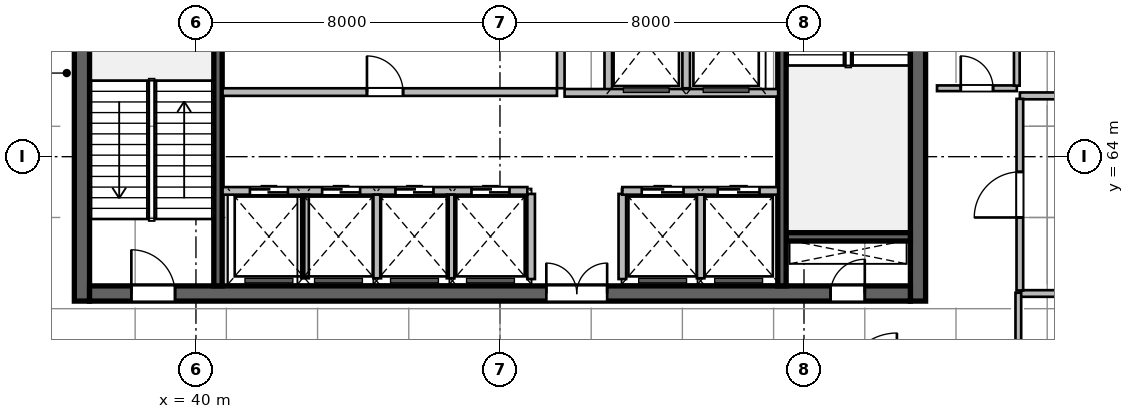
"""IFC4 building model, lengths in metres.
Left out: names, types, materials, properties, quantities, classifications, styles, units other than length and angle.
Written with IfcOpenShell. Run it as: python <this file> out.ifc"""

import sys

from ifc_helpers import new_model, si_unit, direction, frame, frame_2d, origin, place, context, subcontext, project, spatial, rectangle, extrude, source, transform, mapped, element, fill, save


model = new_model("IFC4")
c1 = context("Model", 3, precision=1e-05, world=origin(), true_north=direction((0.0, 1.0)))
c2 = subcontext(c1, "Body", "Model", "MODEL_VIEW")
j1 = project(units=[si_unit("LENGTHUNIT", "METRE"), si_unit("PLANEANGLEUNIT", "RADIAN")], contexts=[c1])
p1 = place(None, origin())
s1 = spatial("IfcSite", under=j1, at=p1, CompositionType="ELEMENT")
p2 = place(p1, origin())
s2 = spatial("IfcBuilding", under=s1, at=p2, CompositionType="ELEMENT")
p3 = place(p2, frame((0.0, 0.0, 303.0)))
s3 = spatial("IfcBuildingStorey", under=s2, at=p3, CompositionType="ELEMENT", Elevation=303.0)
m1 = source(origin(), c2, "Body", "SweptSolid", [
    extrude(rectangle(XDim=12.0, YDim=0.4, at=frame_2d((6.0, 0.0))), origin(), (0.0, 0.0, 1.0), 4.8),
])
for number, where, z_axis, x_axis in (
    (1, (37.0, 60.2, 0.0), (0.0, 0.0, 1.0), (0.0, 1.0, 0.0)),
    (2, (59.0, 60.2, 0.0), (0.0, 0.0, 1.0), (0.0, 1.0, 0.0)),
):
    element("IfcWall", number, at=place(p3, frame(where, z_axis=z_axis, x_axis=x_axis)), inside=s3, PredefinedType="SHEAR", context=c2, shape_type="MappedRepresentation", body=[
        mapped(m1, transform((0.0, 0.0, 0.0), scale=1.0)),
    ])
m2 = source(origin(), c2, "Body", "SweptSolid", [
    extrude(rectangle(XDim=21.6, YDim=0.4, at=frame_2d((10.8, 0.0))), origin(), (0.0, 0.0, 1.0), 4.8),
])
p4 = place(p3, frame((37.2, 60.4, 0.0), z_axis=(0.0, 0.0, 1.0), x_axis=(1.0, 0.0, 0.0)))
e3 = element("IfcWall", 3, at=p4, inside=s3, PredefinedType="SHEAR", context=c2, shape_type="MappedRepresentation", body=[
    mapped(m2, transform((0.0, 0.0, 0.0), scale=1.0)),
])
p5 = place(p4, frame((1.1, 0.0, 0.0)))
e4 = element("IfcOpeningElement", 4, at=p5, cuts=e3, PredefinedType="OPENING", context=c2, shape_type="SweptSolid", body=[
    extrude(rectangle(XDim=1.15, YDim=2.15, at=frame_2d((0.575, 1.075))), frame((0.0, 0.21, 0.0), z_axis=(0.0, -1.0, 0.0), x_axis=(1.0, 0.0, 0.0)), (0.0, 0.0, 1.0), 0.42),
])
p6 = place(p4, frame((19.5, 0.0, 0.0)))
e5 = element("IfcOpeningElement", 5, at=p6, cuts=e3, PredefinedType="OPENING", context=c2, shape_type="SweptSolid", body=[
    extrude(rectangle(XDim=0.9, YDim=2.1, at=frame_2d((0.45, 1.05))), frame((0.0, 0.21, 0.0), z_axis=(0.0, -1.0, 0.0), x_axis=(1.0, 0.0, 0.0)), (0.0, 0.0, 1.0), 0.42),
])
p7 = place(p4, frame((12.02, 0.0, 0.0)))
e6 = element("IfcOpeningElement", 6, at=p7, cuts=e3, PredefinedType="OPENING", context=c2, shape_type="SweptSolid", body=[
    extrude(rectangle(XDim=1.6, YDim=2.15, at=frame_2d((0.8, 1.075))), frame((0.0, 0.21, 0.0), z_axis=(0.0, -1.0, 0.0), x_axis=(1.0, 0.0, 0.0)), (0.0, 0.0, 1.0), 0.42),
])
m3 = source(origin(), c2, "Body", "SweptSolid", [
    extrude(rectangle(XDim=3.27, YDim=0.22, at=frame_2d((1.635, 0.0))), origin(), (0.0, 0.0, 1.0), 4.8),
])
p8 = place(p3, frame((55.53, 61.89, 0.0), z_axis=(0.0, 0.0, 1.0), x_axis=(1.0, 0.0, 0.0)))
e7 = element("IfcWall", 7, at=p8, inside=s3, PredefinedType="SHEAR", context=c2, shape_type="MappedRepresentation", body=[
    mapped(m3, transform((0.0, 0.0, 0.0), scale=1.0)),
])
m4 = source(origin(), c2, "Body", "SweptSolid", [
    extrude(rectangle(XDim=11.2, YDim=0.22, at=frame_2d((5.6, 0.0))), origin(), (0.0, 0.0, 1.0), 4.8),
])
p9 = place(p3, frame((40.58, 60.6, 0.0), z_axis=(0.0, 0.0, 1.0), x_axis=(0.0, 1.0, 0.0)))
e8 = element("IfcWall", 8, at=p9, inside=s3, PredefinedType="SHEAR", context=c2, shape_type="MappedRepresentation", body=[
    mapped(m4, transform((0.0, 0.0, 0.0), scale=1.0)),
])
p10 = place(p3, frame((55.42, 60.6, 0.0), z_axis=(0.0, 0.0, 1.0), x_axis=(0.0, 1.0, 0.0)))
e9 = element("IfcWall", 9, at=p10, inside=s3, PredefinedType="SHEAR", context=c2, shape_type="MappedRepresentation", body=[
    mapped(m4, transform((0.0, 0.0, 0.0), scale=1.0)),
])
p11 = place(p10, frame((9.645, 0.0, 0.0)))
e10 = element("IfcOpeningElement", 10, at=p11, cuts=e9, PredefinedType="OPENING", context=c2, shape_type="SweptSolid", body=[
    extrude(rectangle(XDim=1.15, YDim=2.15, at=frame_2d((0.575, 1.075))), frame((0.0, 0.12, 0.0), z_axis=(0.0, -1.0, 0.0), x_axis=(1.0, 0.0, 0.0)), (0.0, 0.0, 1.0), 0.24),
])
m5 = source(origin(), c2, "Body", "SweptSolid", [
    extrude(rectangle(XDim=2.24, YDim=0.2, at=frame_2d((1.12, 0.0))), origin(), (0.0, 0.0, 1.0), 4.54),
])
for number, where, z_axis, x_axis in (
    (11, (48.82, 60.78, 0.0), (0.0, 0.0, 1.0), (0.0, 1.0, 0.0)),
    (12, (51.22, 60.78, 0.0), (0.0, 0.0, 1.0), (0.0, 1.0, 0.0)),
):
    element("IfcWall", number, at=place(p3, frame(where, z_axis=z_axis, x_axis=x_axis)), inside=s3, PredefinedType="SOLIDWALL", context=c2, shape_type="MappedRepresentation", body=[
        mapped(m5, transform((0.0, 0.0, 0.0), scale=1.0)),
    ])
m6 = source(origin(), c2, "Body", "SweptSolid", [
    extrude(rectangle(XDim=5.8, YDim=0.2, at=frame_2d((2.9, 0.0))), origin(), (0.0, 0.0, 1.0), 4.54),
])
p12 = place(p3, frame((49.6, 65.8, 0.0), z_axis=(0.0, 0.0, 1.0), x_axis=(0.0, 1.0, 0.0)))
e13 = element("IfcWall", 13, at=p12, inside=s3, PredefinedType="SOLIDWALL", context=c2, shape_type="MappedRepresentation", body=[
    mapped(m6, transform((0.0, 0.0, 0.0), scale=1.0)),
])
m7 = source(origin(), c2, "Body", "SweptSolid", [
    extrude(rectangle(XDim=2.58, YDim=0.2, at=frame_2d((1.29, 0.0))), origin(), (0.0, 0.0, 1.0), 4.54),
])
p13 = place(p3, frame((50.85, 65.68, 0.0), z_axis=(0.0, 0.0, 1.0), x_axis=(0.0, 1.0, 0.0)))
e14 = element("IfcWall", 14, at=p13, inside=s3, PredefinedType="SOLIDWALL", context=c2, shape_type="MappedRepresentation", body=[
    mapped(m7, transform((0.0, 0.0, 0.0), scale=1.0)),
])
m8 = source(origin(), c2, "Body", "SweptSolid", [
    extrude(rectangle(XDim=2.4, YDim=0.2, at=frame_2d((1.2, 0.0))), origin(), (0.0, 0.0, 1.0), 4.54),
])
p14 = place(p3, frame((52.9, 65.8, 0.0), z_axis=(0.0, 0.0, 1.0), x_axis=(0.0, 1.0, 0.0)))
e15 = element("IfcWall", 15, at=p14, inside=s3, PredefinedType="SOLIDWALL", context=c2, shape_type="MappedRepresentation", body=[
    mapped(m8, transform((0.0, 0.0, 0.0), scale=1.0)),
])
m9 = source(origin(), c2, "Body", "SweptSolid", [
    extrude(rectangle(XDim=5.62, YDim=0.2, at=frame_2d((2.81, 0.0))), origin(), (0.0, 0.0, 1.0), 4.54),
])
p15 = place(p3, frame((49.7, 65.68, 0.0), z_axis=(0.0, 0.0, 1.0), x_axis=(1.0, 0.0, 0.0)))
e16 = element("IfcWall", 16, at=p15, inside=s3, PredefinedType="SOLIDWALL", context=c2, shape_type="MappedRepresentation", body=[
    mapped(m9, transform((0.0, 0.0, 0.0), scale=1.0)),
])
m10 = source(origin(), c2, "Body", "SweptSolid", [
    extrude(rectangle(XDim=8.02, YDim=0.2, at=frame_2d((4.01, 0.0))), origin(), (0.0, 0.0, 1.0), 4.54),
])
p16 = place(p3, frame((40.7, 63.1, 0.0), z_axis=(0.0, 0.0, 1.0), x_axis=(1.0, 0.0, 0.0)))
e17 = element("IfcWall", 17, at=p16, inside=s3, PredefinedType="SOLIDWALL", context=c2, shape_type="MappedRepresentation", body=[
    mapped(m10, transform((0.0, 0.0, 0.0), scale=1.0)),
])
p17 = place(p16, frame((0.72, 0.0, 0.0)))
e18 = element("IfcOpeningElement", 18, at=p17, cuts=e17, PredefinedType="OPENING", context=c2, shape_type="SweptSolid", body=[
    extrude(rectangle(XDim=1.0, YDim=2.15, at=frame_2d((0.5, 1.075))), frame((0.0, 0.11, 0.0), z_axis=(0.0, -1.0, 0.0), x_axis=(1.0, 0.0, 0.0)), (0.0, 0.0, 1.0), 0.22),
])
p18 = place(p16, frame((2.62, 0.0, 0.0)))
e19 = element("IfcOpeningElement", 19, at=p18, cuts=e17, PredefinedType="OPENING", context=c2, shape_type="SweptSolid", body=[
    extrude(rectangle(XDim=1.0, YDim=2.15, at=frame_2d((0.5, 1.075))), frame((0.0, 0.11, 0.0), z_axis=(0.0, -1.0, 0.0), x_axis=(1.0, 0.0, 0.0)), (0.0, 0.0, 1.0), 0.22),
])
p19 = place(p16, frame((4.55, 0.0, 0.0)))
e20 = element("IfcOpeningElement", 20, at=p19, cuts=e17, PredefinedType="OPENING", context=c2, shape_type="SweptSolid", body=[
    extrude(rectangle(XDim=1.0, YDim=2.15, at=frame_2d((0.5, 1.075))), frame((0.0, 0.11, 0.0), z_axis=(0.0, -1.0, 0.0), x_axis=(1.0, 0.0, 0.0)), (0.0, 0.0, 1.0), 0.22),
])
p20 = place(p16, frame((6.55, 0.0, 0.0)))
e21 = element("IfcOpeningElement", 21, at=p20, cuts=e17, PredefinedType="OPENING", context=c2, shape_type="SweptSolid", body=[
    extrude(rectangle(XDim=1.0, YDim=2.15, at=frame_2d((0.5, 1.075))), frame((0.0, 0.11, 0.0), z_axis=(0.0, -1.0, 0.0), x_axis=(1.0, 0.0, 0.0)), (0.0, 0.0, 1.0), 0.22),
])
m11 = source(origin(), c2, "Body", "SweptSolid", [
    extrude(rectangle(XDim=4.1, YDim=0.2, at=frame_2d((2.05, 0.0))), origin(), (0.0, 0.0, 1.0), 4.54),
])
p21 = place(p3, frame((51.22, 63.1, 0.0), z_axis=(0.0, 0.0, 1.0), x_axis=(1.0, 0.0, 0.0)))
e22 = element("IfcWall", 22, at=p21, inside=s3, PredefinedType="SOLIDWALL", context=c2, shape_type="MappedRepresentation", body=[
    mapped(m11, transform((0.0, 0.0, 0.0), scale=1.0)),
])
p22 = place(p21, frame((0.51, 0.0, 0.0)))
e23 = element("IfcOpeningElement", 23, at=p22, cuts=e22, PredefinedType="OPENING", context=c2, shape_type="SweptSolid", body=[
    extrude(rectangle(XDim=1.1, YDim=2.15, at=frame_2d((0.55, 1.075))), frame((0.0, 0.11, 0.0), z_axis=(0.0, -1.0, 0.0), x_axis=(1.0, 0.0, 0.0)), (0.0, 0.0, 1.0), 0.22),
])
p23 = place(p21, frame((2.51, 0.0, 0.0)))
e24 = element("IfcOpeningElement", 24, at=p23, cuts=e22, PredefinedType="OPENING", context=c2, shape_type="SweptSolid", body=[
    extrude(rectangle(XDim=1.1, YDim=2.15, at=frame_2d((0.55, 1.075))), frame((0.0, 0.11, 0.0), z_axis=(0.0, -1.0, 0.0), x_axis=(1.0, 0.0, 0.0)), (0.0, 0.0, 1.0), 0.22),
])
m12 = source(origin(), c2, "Body", "SweptSolid", [
    extrude(rectangle(XDim=2.2, YDim=0.2, at=frame_2d((1.1, 0.0))), origin(), (0.0, 0.0, 1.0), 4.54),
])
for number, where, z_axis, x_axis in (
    (25, (42.87, 60.8, 0.0), (0.0, 0.0, 1.0), (0.0, 1.0, 0.0)),
    (26, (44.77, 60.8, 0.0), (0.0, 0.0, 1.0), (0.0, 1.0, 0.0)),
    (27, (46.7, 60.8, 0.0), (0.0, 0.0, 1.0), (0.0, 1.0, 0.0)),
    (28, (53.28, 60.8, 0.0), (0.0, 0.0, 1.0), (0.0, 1.0, 0.0)),
):
    element("IfcWall", number, at=place(p3, frame(where, z_axis=z_axis, x_axis=x_axis)), inside=s3, PredefinedType="SOLIDWALL", context=c2, shape_type="MappedRepresentation", body=[
        mapped(m12, transform((0.0, 0.0, 0.0), scale=1.0)),
    ])
m13 = source(origin(), c2, "Body", "SweptSolid", [
    extrude(rectangle(XDim=8.8, YDim=0.2, at=frame_2d((4.4, 0.0))), origin(), (0.0, 0.0, 1.0), 4.54),
])
p24 = place(p3, frame((40.7, 65.7, 0.0), z_axis=(0.0, 0.0, 1.0), x_axis=(1.0, 0.0, 0.0)))
e29 = element("IfcWall", 29, at=p24, inside=s3, PredefinedType="SOLIDWALL", context=c2, shape_type="MappedRepresentation", body=[
    mapped(m13, transform((0.0, 0.0, 0.0), scale=1.0)),
])
p25 = place(p24, frame((3.8, 0.0, 0.0)))
e30 = element("IfcOpeningElement", 30, at=p25, cuts=e29, PredefinedType="OPENING", context=c2, shape_type="SweptSolid", body=[
    extrude(rectangle(XDim=0.95, YDim=2.15, at=frame_2d((0.475, 1.075))), frame((0.0, 0.11, 0.0), z_axis=(0.0, -1.0, 0.0), x_axis=(1.0, 0.0, 0.0)), (0.0, 0.0, 1.0), 0.22),
])
m14 = source(origin(), c2, "Body", "SweptSolid", [
    extrude(rectangle(XDim=2.1, YDim=0.15, at=frame_2d((1.05, 0.0))), origin(), (0.0, 0.0, 1.0), 4.54),
])
p26 = place(p3, frame((59.5, 65.8, 0.0), z_axis=(0.0, 0.0, 1.0), x_axis=(1.0, 0.0, 0.0)))
e31 = element("IfcWall", 31, at=p26, inside=s3, PredefinedType="PARTITIONING", context=c2, shape_type="MappedRepresentation", body=[
    mapped(m14, transform((0.0, 0.0, 0.0), scale=1.0)),
])
p27 = place(p26, frame((0.625, 0.0, 0.0)))
e32 = element("IfcOpeningElement", 32, at=p27, cuts=e31, PredefinedType="OPENING", context=c2, shape_type="SweptSolid", body=[
    extrude(rectangle(XDim=0.85, YDim=2.1, at=frame_2d((0.425, 1.05))), frame((0.0, 0.085, 0.0), z_axis=(0.0, -1.0, 0.0), x_axis=(1.0, 0.0, 0.0)), (0.0, 0.0, 1.0), 0.17),
])
m15 = source(origin(), c2, "Body", "SweptSolid", [
    extrude(rectangle(XDim=3.565, YDim=0.15, at=frame_2d((1.783, 0.0))), origin(), (0.0, 0.0, 1.0), 4.54),
])
p28 = place(p3, frame((61.6, 65.867, 0.0), z_axis=(0.0, 0.0, 1.0), x_axis=(0.0, 1.0, 0.0)))
e33 = element("IfcWall", 33, at=p28, inside=s3, PredefinedType="PARTITIONING", context=c2, shape_type="MappedRepresentation", body=[
    mapped(m15, transform((0.0, 0.0, 0.0), scale=1.0)),
])
m16 = source(origin(), c2, "Body", "SweptSolid", [
    extrude(rectangle(XDim=7.52, YDim=0.175, at=frame_2d((3.76, 0.0))), origin(), (0.0, 0.0, 1.0), 4.54),
])
p29 = place(p3, frame((61.68, 60.4, 0.0), z_axis=(0.0, 0.0, 1.0), x_axis=(1.0, 0.0, 0.0)))
e34 = element("IfcWall", 34, at=p29, inside=s3, PredefinedType="PARTITIONING", context=c2, shape_type="MappedRepresentation", body=[
    mapped(m16, transform((0.0, 0.0, 0.0), scale=1.0)),
])
m17 = source(origin(), c2, "Body", "SweptSolid", [
    extrude(rectangle(XDim=7.52, YDim=0.18, at=frame_2d((3.76, 0.0))), origin(), (0.0, 0.0, 1.0), 4.54),
])
p30 = place(p3, frame((61.68, 65.6, 0.0), z_axis=(0.0, 0.0, 1.0), x_axis=(1.0, 0.0, 0.0)))
e35 = element("IfcWall", 35, at=p30, inside=s3, PredefinedType="PLUMBINGWALL", context=c2, shape_type="MappedRepresentation", body=[
    mapped(m17, transform((0.0, 0.0, 0.0), scale=1.0)),
])
m18 = source(origin(), c2, "Body", "SweptSolid", [
    extrude(rectangle(XDim=5.042, YDim=0.175, at=frame_2d((2.521, 0.0))), origin(), (0.0, 0.0, 1.0), 4.54),
])
p31 = place(p3, frame((61.68, 60.479, 0.0), z_axis=(0.0, 0.0, 1.0), x_axis=(0.0, 1.0, 0.0)))
e36 = element("IfcWall", 36, at=p31, inside=s3, PredefinedType="PARTITIONING", context=c2, shape_type="MappedRepresentation", body=[
    mapped(m18, transform((0.0, 0.0, 0.0), scale=1.0)),
])
p32 = place(p31, frame((1.921, 0.0, 0.0)))
e37 = element("IfcOpeningElement", 37, at=p32, cuts=e36, PredefinedType="OPENING", context=c2, shape_type="SweptSolid", body=[
    extrude(rectangle(XDim=1.2, YDim=2.15, at=frame_2d((0.6, 1.075))), frame((0.0, 0.098, 0.0), z_axis=(0.0, -1.0, 0.0), x_axis=(1.0, 0.0, 0.0)), (0.0, 0.0, 1.0), 0.195),
])
m19 = source(origin(), c2, "Body", "SweptSolid", [
    extrude(rectangle(XDim=2.46, YDim=0.15, at=frame_2d((1.23, 0.0))), origin(), (0.0, 0.0, 1.0), 4.54),
])
p33 = place(p3, frame((61.64, 57.96, 0.0), z_axis=(0.0, 0.0, 1.0), x_axis=(0.0, 1.0, 0.0)))
e38 = element("IfcWall", 38, at=p33, inside=s3, PredefinedType="PARTITIONING", context=c2, shape_type="MappedRepresentation", body=[
    mapped(m19, transform((0.0, 0.0, 0.0), scale=1.0)),
])
m20 = source(origin(), c2, "Body", "SweptSolid", [
    extrude(rectangle(XDim=1.15, YDim=2.15, at=frame_2d((0.575, 1.075))), frame((0.0, 0.025, 0.0), z_axis=(0.0, -1.0, 0.0), x_axis=(1.0, 0.0, 0.0)), (0.0, 0.0, 1.0), 0.05),
])
p34 = place(p5, origin())
e39 = element("IfcDoor", 39, at=p34, inside=s3, OperationType="SINGLE_SWING_LEFT", PredefinedType="DOOR", context=c2, shape_type="MappedRepresentation", body=[
    mapped(m20, transform((0.0, 0.0, 0.0), scale=1.0)),
])
fill(e4, e39)
m21 = source(origin(), c2, "Body", "SweptSolid", [
    extrude(rectangle(XDim=0.9, YDim=2.1, at=frame_2d((0.45, 1.05))), frame((0.0, 0.025, 0.0), z_axis=(0.0, -1.0, 0.0), x_axis=(1.0, 0.0, 0.0)), (0.0, 0.0, 1.0), 0.05),
])
p35 = place(p6, origin())
e40 = element("IfcDoor", 40, at=p35, inside=s3, OperationType="SINGLE_SWING_RIGHT", PredefinedType="DOOR", context=c2, shape_type="MappedRepresentation", body=[
    mapped(m21, transform((0.0, 0.0, 0.0), scale=1.0)),
])
fill(e5, e40)
m22 = source(origin(), c2, "Body", "SweptSolid", [
    extrude(rectangle(XDim=1.6, YDim=2.15, at=frame_2d((0.8, 1.075))), frame((0.0, 0.025, 0.0), z_axis=(0.0, -1.0, 0.0), x_axis=(1.0, 0.0, 0.0)), (0.0, 0.0, 1.0), 0.05),
])
p36 = place(p7, origin())
e41 = element("IfcDoor", 41, at=p36, inside=s3, OperationType="DOUBLE_DOOR_SINGLE_SWING", PredefinedType="DOOR", context=c2, shape_type="MappedRepresentation", body=[
    mapped(m22, transform((0.0, 0.0, 0.0), scale=1.0)),
])
fill(e6, e41)
m23 = source(origin(), c2, "Body", "SweptSolid", [
    extrude(rectangle(XDim=1.0, YDim=2.15, at=frame_2d((0.5, 1.075))), frame((0.0, 0.025, 0.0), z_axis=(0.0, -1.0, 0.0), x_axis=(1.0, 0.0, 0.0)), (0.0, 0.0, 1.0), 0.05),
])
p37 = place(p17, origin())
e42 = element("IfcDoor", 42, at=p37, inside=s3, OperationType="DOUBLE_DOOR_SLIDING", PredefinedType="DOOR", context=c2, shape_type="MappedRepresentation", body=[
    mapped(m23, transform((0.0, 0.0, 0.0), scale=1.0)),
])
fill(e18, e42)
p38 = place(p18, origin())
e43 = element("IfcDoor", 43, at=p38, inside=s3, OperationType="DOUBLE_DOOR_SLIDING", PredefinedType="DOOR", context=c2, shape_type="MappedRepresentation", body=[
    mapped(m23, transform((0.0, 0.0, 0.0), scale=1.0)),
])
fill(e19, e43)
p39 = place(p19, origin())
e44 = element("IfcDoor", 44, at=p39, inside=s3, OperationType="DOUBLE_DOOR_SLIDING", PredefinedType="DOOR", context=c2, shape_type="MappedRepresentation", body=[
    mapped(m23, transform((0.0, 0.0, 0.0), scale=1.0)),
])
fill(e20, e44)
p40 = place(p20, origin())
e45 = element("IfcDoor", 45, at=p40, inside=s3, OperationType="DOUBLE_DOOR_SLIDING", PredefinedType="DOOR", context=c2, shape_type="MappedRepresentation", body=[
    mapped(m23, transform((0.0, 0.0, 0.0), scale=1.0)),
])
fill(e21, e45)
m24 = source(origin(), c2, "Body", "SweptSolid", [
    extrude(rectangle(XDim=1.1, YDim=2.15, at=frame_2d((0.55, 1.075))), frame((0.0, 0.025, 0.0), z_axis=(0.0, -1.0, 0.0), x_axis=(1.0, 0.0, 0.0)), (0.0, 0.0, 1.0), 0.05),
])
p41 = place(p22, origin())
e46 = element("IfcDoor", 46, at=p41, inside=s3, OperationType="DOUBLE_DOOR_SLIDING", PredefinedType="DOOR", context=c2, shape_type="MappedRepresentation", body=[
    mapped(m24, transform((0.0, 0.0, 0.0), scale=1.0)),
])
fill(e23, e46)
p42 = place(p23, origin())
e47 = element("IfcDoor", 47, at=p42, inside=s3, OperationType="DOUBLE_DOOR_SLIDING", PredefinedType="DOOR", context=c2, shape_type="MappedRepresentation", body=[
    mapped(m24, transform((0.0, 0.0, 0.0), scale=1.0)),
])
fill(e24, e47)
m25 = source(origin(), c2, "Body", "SweptSolid", [
    extrude(rectangle(XDim=0.95, YDim=2.15, at=frame_2d((0.475, 1.075))), frame((0.0, 0.025, 0.0), z_axis=(0.0, -1.0, 0.0), x_axis=(1.0, 0.0, 0.0)), (0.0, 0.0, 1.0), 0.05),
])
p43 = place(p25, origin())
e48 = element("IfcDoor", 48, at=p43, inside=s3, OperationType="SINGLE_SWING_LEFT", PredefinedType="DOOR", context=c2, shape_type="MappedRepresentation", body=[
    mapped(m25, transform((0.0, 0.0, 0.0), scale=1.0)),
])
fill(e30, e48)
m26 = source(origin(), c2, "Body", "SweptSolid", [
    extrude(rectangle(XDim=0.85, YDim=2.1, at=frame_2d((0.425, 1.05))), frame((0.0, 0.025, 0.0), z_axis=(0.0, -1.0, 0.0), x_axis=(1.0, 0.0, 0.0)), (0.0, 0.0, 1.0), 0.05),
])
p44 = place(p27, origin())
e49 = element("IfcDoor", 49, at=p44, inside=s3, OperationType="SINGLE_SWING_LEFT", PredefinedType="DOOR", context=c2, shape_type="MappedRepresentation", body=[
    mapped(m26, transform((0.0, 0.0, 0.0), scale=1.0)),
])
fill(e32, e49)
m27 = source(origin(), c2, "Body", "SweptSolid", [
    extrude(rectangle(XDim=1.2, YDim=2.15, at=frame_2d((0.6, 1.075))), frame((0.0, 0.025, 0.0), z_axis=(0.0, -1.0, 0.0), x_axis=(1.0, 0.0, 0.0)), (0.0, 0.0, 1.0), 0.05),
])
p45 = place(p32, origin())
e50 = element("IfcDoor", 50, at=p45, inside=s3, OperationType="SINGLE_SWING_LEFT", PredefinedType="DOOR", context=c2, shape_type="MappedRepresentation", body=[
    mapped(m27, transform((0.0, 0.0, 0.0), scale=1.0)),
])
fill(e37, e50)
save(model, sys.argv[1])
